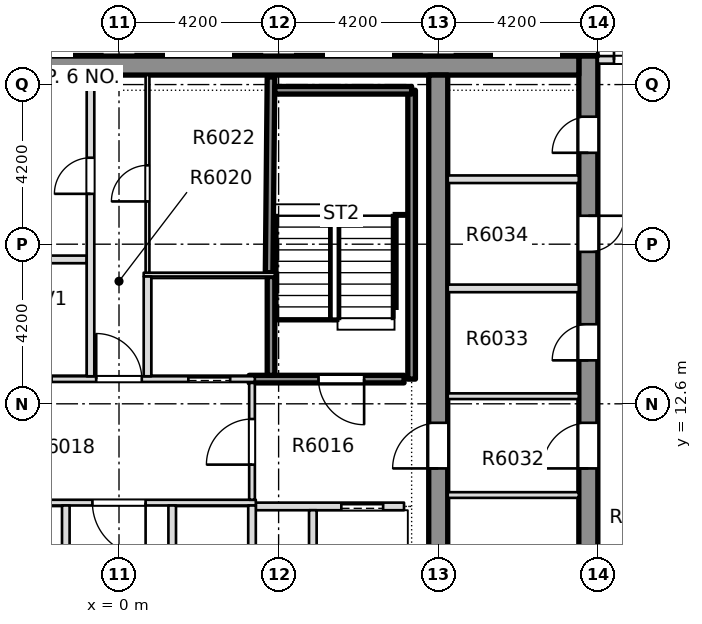
"""IFC4 building model, lengths in metres.
Left out: names, types, materials, properties, quantities, classifications, styles, units other than length and angle.
Written with IfcOpenShell. Run it as: python <this file> out.ifc"""

import sys

from ifc_helpers import new_model, si_unit, direction, frame, frame_2d, origin, place, context, subcontext, project, spatial, rectangle, extrude, element, fill, save


model = new_model("IFC4")
c1 = context("Model", 3, precision=1e-05, world=origin(), true_north=direction((0.0, 1.0)))
c2 = subcontext(c1, "Body", "Model", "MODEL_VIEW")
j1 = project(units=[si_unit("LENGTHUNIT", "METRE"), si_unit("PLANEANGLEUNIT", "RADIAN")], contexts=[c1])
p1 = place(None, origin())
s1 = spatial("IfcSite", under=j1, at=p1, CompositionType="ELEMENT")
p2 = place(p1, origin())
s2 = spatial("IfcBuilding", under=s1, at=p2, CompositionType="ELEMENT")
p3 = place(p2, frame((0.0, 0.0, 230.35)))
s3 = spatial("IfcBuildingStorey", under=s2, at=p3, CompositionType="ELEMENT", Elevation=230.35)
p4 = place(p3, frame((12.35, -8.4, -0.4), z_axis=(0.0, 0.0, 1.0), x_axis=(0.0, 1.0, 0.0)))
e1 = element("IfcWall", 1, at=p4, inside=s3, PredefinedType="SHEAR", context=c2, shape_type="SweptSolid", body=[
    extrude(rectangle(XDim=30.15, YDim=0.5, at=frame_2d((15.075, 0.0))), origin(), (0.0, 0.0, 1.0), 3.45),
])
p5 = place(p4, frame((4.113, 0.0, 0.4)))
e2 = element("IfcOpeningElement", 2, at=p5, cuts=e1, PredefinedType="OPENING", context=c2, shape_type="SweptSolid", body=[
    extrude(rectangle(XDim=0.95, YDim=2.1, at=frame_2d((0.475, 1.05))), frame((0.0, 0.26, 0.0), z_axis=(0.0, -1.0, 0.0), x_axis=(1.0, 0.0, 0.0)), (0.0, 0.0, 1.0), 0.52),
])
p6 = place(p4, frame((9.89, 0.0, 0.4)))
e3 = element("IfcOpeningElement", 3, at=p6, cuts=e1, PredefinedType="OPENING", context=c2, shape_type="SweptSolid", body=[
    extrude(rectangle(XDim=0.95, YDim=2.1, at=frame_2d((0.475, 1.05))), frame((0.0, 0.26, 0.0), z_axis=(0.0, -1.0, 0.0), x_axis=(1.0, 0.0, 0.0)), (0.0, 0.0, 1.0), 0.52),
])
p7 = place(p4, frame((15.052, 0.0, 0.4)))
e4 = element("IfcOpeningElement", 4, at=p7, cuts=e1, PredefinedType="OPENING", context=c2, shape_type="SweptSolid", body=[
    extrude(rectangle(XDim=0.95, YDim=2.1, at=frame_2d((0.475, 1.05))), frame((0.0, 0.26, 0.0), z_axis=(0.0, -1.0, 0.0), x_axis=(1.0, 0.0, 0.0)), (0.0, 0.0, 1.0), 0.52),
])
p8 = place(p4, frame((22.144, 0.0, 0.4)))
e5 = element("IfcOpeningElement", 5, at=p8, cuts=e1, PredefinedType="OPENING", context=c2, shape_type="SweptSolid", body=[
    extrude(rectangle(XDim=0.95, YDim=2.1, at=frame_2d((0.475, 1.05))), frame((0.0, 0.26, 0.0), z_axis=(0.0, -1.0, 0.0), x_axis=(1.0, 0.0, 0.0)), (0.0, 0.0, 1.0), 0.52),
])
p9 = place(p4, frame((24.998, 0.0, 0.4)))
e6 = element("IfcOpeningElement", 6, at=p9, cuts=e1, PredefinedType="OPENING", context=c2, shape_type="SweptSolid", body=[
    extrude(rectangle(XDim=0.95, YDim=2.1, at=frame_2d((0.475, 1.05))), frame((0.0, 0.26, 0.0), z_axis=(0.0, -1.0, 0.0), x_axis=(1.0, 0.0, 0.0)), (0.0, 0.0, 1.0), 0.52),
])
p10 = place(p4, frame((27.605, 0.0, 0.4)))
e7 = element("IfcOpeningElement", 7, at=p10, cuts=e1, PredefinedType="OPENING", context=c2, shape_type="SweptSolid", body=[
    extrude(rectangle(XDim=0.95, YDim=2.1, at=frame_2d((0.475, 1.05))), frame((0.0, 0.26, 0.0), z_axis=(0.0, -1.0, 0.0), x_axis=(1.0, 0.0, 0.0)), (0.0, 0.0, 1.0), 0.52),
])
p11 = place(p4, frame((19.3, 0.0, 0.4)))
e8 = element("IfcOpeningElement", 8, at=p11, cuts=e1, PredefinedType="OPENING", context=c2, shape_type="SweptSolid", body=[
    extrude(rectangle(XDim=1.2, YDim=2.1, at=frame_2d((0.6, 1.05))), frame((0.0, 0.26, 0.0), z_axis=(0.0, -1.0, 0.0), x_axis=(1.0, 0.0, 0.0)), (0.0, 0.0, 1.0), 0.52),
])
p12 = place(p3, frame((-12.1, 21.5, -0.4), z_axis=(0.0, 0.0, 1.0), x_axis=(1.0, 0.0, 0.0)))
e9 = element("IfcWall", 9, at=p12, inside=s3, PredefinedType="SHEAR", context=c2, shape_type="SweptSolid", body=[
    extrude(rectangle(XDim=24.2, YDim=0.5, at=frame_2d((12.1, 0.0))), origin(), (0.0, 0.0, 1.0), 3.45),
])
p13 = place(p3, frame((8.4, -7.9, -0.4), z_axis=(0.0, 0.0, 1.0), x_axis=(0.0, 1.0, 0.0)))
e10 = element("IfcWall", 10, at=p13, inside=s3, PredefinedType="SHEAR", context=c2, shape_type="SweptSolid", body=[
    extrude(rectangle(XDim=29.15, YDim=0.5, at=frame_2d((14.575, 0.0))), origin(), (0.0, 0.0, 1.0), 3.45),
])
p14 = place(p13, frame((18.8, 0.0, 0.4)))
e11 = element("IfcOpeningElement", 11, at=p14, cuts=e10, PredefinedType="OPENING", context=c2, shape_type="SweptSolid", body=[
    extrude(rectangle(XDim=1.2, YDim=2.1, at=frame_2d((0.6, 1.05))), frame((0.0, 0.26, 0.0), z_axis=(0.0, -1.0, 0.0), x_axis=(1.0, 0.0, 0.0)), (0.0, 0.0, 1.0), 0.52),
])
p15 = place(p3, frame((16.35, 21.65, 0.0), z_axis=(0.0, 0.0, 1.0), x_axis=(-1.0, 0.0, 0.0)))
e12 = element("IfcWall", 12, at=p15, inside=s3, PredefinedType="STANDARD", context=c2, shape_type="SweptSolid", body=[
    extrude(rectangle(XDim=3.75, YDim=0.2, at=frame_2d((1.875, 0.0))), origin(), (0.0, 0.0, 1.0), 3.05),
])
p16 = place(p15, frame((2.325, 0.0, 0.0)))
e13 = element("IfcOpeningElement", 13, at=p16, cuts=e12, PredefinedType="OPENING", context=c2, shape_type="SweptSolid", body=[
    extrude(rectangle(XDim=1.0, YDim=2.4, at=frame_2d((0.5, 1.2))), frame((0.0, 0.11, 0.0), z_axis=(0.0, -1.0, 0.0), x_axis=(1.0, 0.0, 0.0)), (0.0, 0.0, 1.0), 0.22),
])
p17 = place(p3, frame((3.6, 9.9, 0.0), z_axis=(0.0, 0.0, 1.0), x_axis=(1.0, 0.0, 0.0)))
e14 = element("IfcWall", 14, at=p17, inside=s3, PredefinedType="PARTITIONING", context=c2, shape_type="SweptSolid", body=[
    extrude(rectangle(XDim=3.9, YDim=0.2, at=frame_2d((1.95, 0.0))), origin(), (0.0, 0.0, 1.0), 3.05),
])
p18 = place(p17, frame((2.25, 0.0, 0.0)))
e15 = element("IfcOpeningElement", 15, at=p18, cuts=e14, PredefinedType="OPENING", context=c2, shape_type="SweptSolid", body=[
    extrude(rectangle(XDim=1.1, YDim=2.1, at=frame_2d((0.55, 1.05))), frame((0.0, 0.11, 0.0), z_axis=(0.0, -1.0, 0.0), x_axis=(1.0, 0.0, 0.0)), (0.0, 0.0, 1.0), 0.22),
])
p19 = place(p3, frame((-3.6, 10.0, 0.0), z_axis=(0.0, 0.0, 1.0), x_axis=(1.0, 0.0, 0.0)))
e16 = element("IfcWall", 16, at=p19, inside=s3, PredefinedType="PARTITIONING", context=c2, shape_type="SweptSolid", body=[
    extrude(rectangle(XDim=7.2, YDim=0.15, at=frame_2d((3.6, 0.0))), origin(), (0.0, 0.0, 1.0), 3.05),
])
p20 = place(p19, frame((2.9, 0.0, 0.0)))
e17 = element("IfcOpeningElement", 17, at=p20, cuts=e16, PredefinedType="OPENING", context=c2, shape_type="SweptSolid", body=[
    extrude(rectangle(XDim=1.4, YDim=2.1, at=frame_2d((0.7, 1.05))), frame((0.0, 0.085, 0.0), z_axis=(0.0, -1.0, 0.0), x_axis=(1.0, 0.0, 0.0)), (0.0, 0.0, 1.0), 0.17),
])
p21 = place(p3, frame((-3.575, 13.25, 0.0), z_axis=(0.0, 0.0, 1.0), x_axis=(1.0, 0.0, 0.0)))
e18 = element("IfcWall", 18, at=p21, inside=s3, PredefinedType="PARTITIONING", context=c2, shape_type="SweptSolid", body=[
    extrude(rectangle(XDim=7.15, YDim=0.15, at=frame_2d((3.575, 0.0))), origin(), (0.0, 0.0, 1.0), 3.05),
])
p22 = place(p21, frame((0.6, 0.0, 0.0)))
e19 = element("IfcOpeningElement", 19, at=p22, cuts=e18, PredefinedType="OPENING", context=c2, shape_type="SweptSolid", body=[
    extrude(rectangle(XDim=1.2, YDim=2.1, at=frame_2d((0.6, 1.05))), frame((0.0, 0.085, 0.0), z_axis=(0.0, -1.0, 0.0), x_axis=(1.0, 0.0, 0.0)), (0.0, 0.0, 1.0), 0.17),
])
p23 = place(p21, frame((5.4, 0.0, 0.0)))
e20 = element("IfcOpeningElement", 20, at=p23, cuts=e18, PredefinedType="OPENING", context=c2, shape_type="SweptSolid", body=[
    extrude(rectangle(XDim=1.1, YDim=2.1, at=frame_2d((0.55, 1.05))), frame((0.0, 0.085, 0.0), z_axis=(0.0, -1.0, 0.0), x_axis=(1.0, 0.0, 0.0)), (0.0, 0.0, 1.0), 0.17),
])
p24 = place(p21, frame((2.975, 0.0, 0.0)))
e21 = element("IfcOpeningElement", 21, at=p24, cuts=e18, PredefinedType="OPENING", context=c2, shape_type="SweptSolid", body=[
    extrude(rectangle(XDim=1.2, YDim=2.1, at=frame_2d((0.6, 1.05))), frame((0.0, 0.085, 0.0), z_axis=(0.0, -1.0, 0.0), x_axis=(1.0, 0.0, 0.0)), (0.0, 0.0, 1.0), 0.17),
])
p25 = place(p3, frame((3.425, 13.25, 0.0), z_axis=(0.0, 0.0, 1.0), x_axis=(1.0, 0.0, 0.0)))
e22 = element("IfcWall", 22, at=p25, inside=s3, PredefinedType="SOLIDWALL", context=c2, shape_type="SweptSolid", body=[
    extrude(rectangle(XDim=4.075, YDim=0.2, at=frame_2d((2.038, 0.0))), origin(), (0.0, 0.0, 1.0), 3.05),
])
p26 = place(p25, frame((1.825, 0.0, 0.0)))
e23 = element("IfcOpeningElement", 23, at=p26, cuts=e22, PredefinedType="OPENING", context=c2, shape_type="SweptSolid", body=[
    extrude(rectangle(XDim=1.2, YDim=2.1, at=frame_2d((0.6, 1.05))), frame((0.0, 0.11, 0.0), z_axis=(0.0, -1.0, 0.0), x_axis=(1.0, 0.0, 0.0)), (0.0, 0.0, 1.0), 0.22),
])
p27 = place(p3, frame((0.65, 16.0, 0.0), z_axis=(0.0, 0.0, 1.0), x_axis=(1.0, 0.0, 0.0)))
e24 = element("IfcWall", 24, at=p27, inside=s3, PredefinedType="PARTITIONING", context=c2, shape_type="SweptSolid", body=[
    extrude(rectangle(XDim=3.45, YDim=0.1, at=frame_2d((1.725, 0.0))), origin(), (0.0, 0.0, 1.0), 3.05),
])
p28 = place(p3, frame((-3.9, 16.4, 0.0), z_axis=(0.0, 0.0, 1.0), x_axis=(1.0, 0.0, 0.0)))
e25 = element("IfcWall", 25, at=p28, inside=s3, PredefinedType="PARTITIONING", context=c2, shape_type="SweptSolid", body=[
    extrude(rectangle(XDim=3.05, YDim=0.2, at=frame_2d((1.525, 0.0))), origin(), (0.0, 0.0, 1.0), 3.05),
])
p29 = place(p3, frame((-1.4, 7.075, 0.0), z_axis=(0.0, 0.0, 1.0), x_axis=(0.0, 1.0, 0.0)))
e26 = element("IfcWall", 26, at=p29, inside=s3, PredefinedType="PARTITIONING", context=c2, shape_type="SweptSolid", body=[
    extrude(rectangle(XDim=2.85, YDim=0.2, at=frame_2d((1.425, 0.0))), origin(), (0.0, 0.0, 1.0), 3.05),
])
p30 = place(p3, frame((-0.75, 13.325, 0.0), z_axis=(0.0, 0.0, 1.0), x_axis=(0.0, 1.0, 0.0)))
e27 = element("IfcWall", 27, at=p30, inside=s3, PredefinedType="PARTITIONING", context=c2, shape_type="SweptSolid", body=[
    extrude(rectangle(XDim=7.924, YDim=0.2, at=frame_2d((3.962, 0.0))), origin(), (0.0, 0.0, 1.0), 3.05),
])
p31 = place(p30, frame((4.8, 0.0, 0.0)))
e28 = element("IfcOpeningElement", 28, at=p31, cuts=e27, PredefinedType="OPENING", context=c2, shape_type="SweptSolid", body=[
    extrude(rectangle(XDim=0.95, YDim=2.1, at=frame_2d((0.475, 1.05))), frame((0.0, 0.11, 0.0), z_axis=(0.0, -1.0, 0.0), x_axis=(1.0, 0.0, 0.0)), (0.0, 0.0, 1.0), 0.22),
])
p32 = place(p3, frame((0.75, 13.325, 0.0), z_axis=(0.0, 0.0, 1.0), x_axis=(0.0, 1.0, 0.0)))
e29 = element("IfcWall", 29, at=p32, inside=s3, PredefinedType="PARTITIONING", context=c2, shape_type="SweptSolid", body=[
    extrude(rectangle(XDim=2.625, YDim=0.2, at=frame_2d((1.312, 0.0))), origin(), (0.0, 0.0, 1.0), 3.05),
])
p33 = place(p3, frame((0.75, 16.05, 0.0), z_axis=(0.0, 0.0, 1.0), x_axis=(0.0, 1.0, 0.0)))
e30 = element("IfcWall", 30, at=p33, inside=s3, PredefinedType="PARTITIONING", context=c2, shape_type="SweptSolid", body=[
    extrude(rectangle(XDim=5.199, YDim=0.1, at=frame_2d((2.6, 0.0))), origin(), (0.0, 0.0, 1.0), 3.05),
])
p34 = place(p33, frame((1.875, 0.0, 0.0)))
e31 = element("IfcOpeningElement", 31, at=p34, cuts=e30, PredefinedType="OPENING", context=c2, shape_type="SweptSolid", body=[
    extrude(rectangle(XDim=0.95, YDim=2.1, at=frame_2d((0.475, 1.05))), frame((0.0, 0.06, 0.0), z_axis=(0.0, -1.0, 0.0), x_axis=(1.0, 0.0, 0.0)), (0.0, 0.0, 1.0), 0.12),
])
for number, where, z_axis, x_axis in (
    (32, (1.4, 7.075, 0.0), (0.0, 0.0, 1.0), (0.0, 1.0, 0.0)),
    (33, (3.5, 7.075, 0.0), (0.0, 0.0, 1.0), (0.0, 1.0, 0.0)),
):
    element("IfcWall", number, at=place(p3, frame(where, z_axis=z_axis, x_axis=x_axis)), inside=s3, PredefinedType="PARTITIONING", context=c2, shape_type="SweptSolid", body=[
        extrude(rectangle(XDim=2.85, YDim=0.2, at=frame_2d((1.425, 0.0))), origin(), (0.0, 0.0, 1.0), 3.05),
    ])
p35 = place(p3, frame((3.5, 10.075, 0.0), z_axis=(0.0, 0.0, 1.0), x_axis=(0.0, 1.0, 0.0)))
e34 = element("IfcWall", 34, at=p35, inside=s3, PredefinedType="PARTITIONING", context=c2, shape_type="SweptSolid", body=[
    extrude(rectangle(XDim=3.075, YDim=0.15, at=frame_2d((1.538, 0.0))), origin(), (0.0, 0.0, 1.0), 3.05),
])
p36 = place(p35, frame((0.925, 0.0, 0.0)))
e35 = element("IfcOpeningElement", 35, at=p36, cuts=e34, PredefinedType="OPENING", context=c2, shape_type="SweptSolid", body=[
    extrude(rectangle(XDim=1.2, YDim=2.1, at=frame_2d((0.6, 1.05))), frame((0.0, 0.085, 0.0), z_axis=(0.0, -1.0, 0.0), x_axis=(1.0, 0.0, 0.0)), (0.0, 0.0, 1.0), 0.17),
])
p37 = place(p3, frame((4.0, 13.35, 0.0), z_axis=(0.0, 0.0, 1.0), x_axis=(0.0, 1.0, 0.0)))
e36 = element("IfcWall", 36, at=p37, inside=s3, PredefinedType="SOLIDWALL", context=c2, shape_type="SweptSolid", body=[
    extrude(rectangle(XDim=2.6, YDim=0.2, at=frame_2d((1.3, 0.0))), origin(), (0.0, 0.0, 1.0), 3.05),
])
p38 = place(p3, frame((3.95, 16.05, 0.0), z_axis=(0.0, 0.0, 1.0), x_axis=(0.009719787395, 0.999952761751, 0.0)))
e37 = element("IfcWall", 37, at=p38, inside=s3, PredefinedType="SOLIDWALL", context=c2, shape_type="SweptSolid", body=[
    extrude(rectangle(XDim=5.149, YDim=0.2, at=frame_2d((2.575, 0.0))), origin(), (0.0, 0.0, 1.0), 3.05),
])
p39 = place(p3, frame((5.1, 7.075, 0.0), z_axis=(0.0, 0.0, 1.0), x_axis=(0.0, 1.0, 0.0)))
e38 = element("IfcWall", 38, at=p39, inside=s3, PredefinedType="PARTITIONING", context=c2, shape_type="SweptSolid", body=[
    extrude(rectangle(XDim=2.725, YDim=0.2, at=frame_2d((1.363, 0.0))), origin(), (0.0, 0.0, 1.0), 3.05),
])
for number, where, z_axis, x_axis in (
    (39, (8.651, 10.2, 0.0), (0.0, 0.0, 1.0), (1.0, 0.0, 0.0)),
    (40, (8.651, 12.8, 0.0), (0.0, 0.0, 1.0), (1.0, 0.0, 0.0)),
):
    element("IfcWall", number, at=place(p3, frame(where, z_axis=z_axis, x_axis=x_axis)), inside=s3, PredefinedType="PARTITIONING", context=c2, shape_type="SweptSolid", body=[
        extrude(rectangle(XDim=3.448, YDim=0.15, at=frame_2d((1.724, 0.0))), origin(), (0.0, 0.0, 1.0), 3.05),
    ])
for number, where, z_axis, x_axis in (
    (41, (8.651, 15.637, 0.0), (0.0, 0.0, 1.0), (1.0, 0.0, 0.0)),
    (42, (8.651, 18.509, 0.0), (0.0, 0.0, 1.0), (1.0, 0.0, 0.0)),
):
    element("IfcWall", number, at=place(p3, frame(where, z_axis=z_axis, x_axis=x_axis)), inside=s3, PredefinedType="PARTITIONING", context=c2, shape_type="SweptSolid", body=[
        extrude(rectangle(XDim=3.448, YDim=0.2, at=frame_2d((1.724, 0.0))), origin(), (0.0, 0.0, 1.0), 3.05),
    ])
p40 = place(p3, frame((7.7, 13.25, 0.0), z_axis=(0.0, 0.0, 1.0), x_axis=(0.0, 1.0, 0.0)))
e43 = element("IfcWall", 43, at=p40, inside=s3, PredefinedType="SOLIDWALL", context=c2, shape_type="SweptSolid", body=[
    extrude(rectangle(XDim=7.6, YDim=0.2, at=frame_2d((3.8, 0.0))), origin(), (0.0, 0.0, 1.0), 3.05),
])
p41 = place(p3, frame((4.1, 20.85, 0.0), z_axis=(0.0, 0.0, 1.0), x_axis=(1.0, 0.0, 0.0)))
e44 = element("IfcWall", 44, at=p41, inside=s3, PredefinedType="SOLIDWALL", context=c2, shape_type="SweptSolid", body=[
    extrude(rectangle(XDim=3.6, YDim=0.2, at=frame_2d((1.8, 0.0))), origin(), (0.0, 0.0, 1.0), 3.05),
])
p42 = place(p16, origin())
e45 = element("IfcDoor", 45, at=p42, inside=s3, OperationType="SINGLE_SWING_LEFT", PredefinedType="DOOR", context=c2, shape_type="SweptSolid", body=[
    extrude(rectangle(XDim=1.0, YDim=2.4, at=frame_2d((0.5, 1.2))), frame((0.0, 0.025, 0.0), z_axis=(0.0, -1.0, 0.0), x_axis=(1.0, 0.0, 0.0)), (0.0, 0.0, 1.0), 0.05),
])
fill(e13, e45)
p43 = place(p26, origin())
e46 = element("IfcDoor", 46, at=p43, inside=s3, OperationType="SINGLE_SWING_RIGHT", PredefinedType="DOOR", context=c2, shape_type="SweptSolid", body=[
    extrude(rectangle(XDim=1.2, YDim=2.1, at=frame_2d((0.6, 1.05))), frame((0.0, 0.025, 0.0), z_axis=(0.0, -1.0, 0.0), x_axis=(1.0, 0.0, 0.0)), (0.0, 0.0, 1.0), 0.05),
])
fill(e23, e46)
p44 = place(p18, origin())
e47 = element("IfcDoor", 47, at=p44, inside=s3, OperationType="SLIDING_TO_LEFT", PredefinedType="DOOR", context=c2, shape_type="SweptSolid", body=[
    extrude(rectangle(XDim=1.1, YDim=2.1, at=frame_2d((0.55, 1.05))), frame((0.0, 0.025, 0.0), z_axis=(0.0, -1.0, 0.0), x_axis=(1.0, 0.0, 0.0)), (0.0, 0.0, 1.0), 0.05),
])
fill(e15, e47)
p45 = place(p20, origin())
e48 = element("IfcDoor", 48, at=p45, inside=s3, OperationType="SINGLE_SWING_RIGHT", PredefinedType="DOOR", context=c2, shape_type="SweptSolid", body=[
    extrude(rectangle(XDim=1.4, YDim=2.1, at=frame_2d((0.7, 1.05))), frame((0.0, 0.025, 0.0), z_axis=(0.0, -1.0, 0.0), x_axis=(1.0, 0.0, 0.0)), (0.0, 0.0, 1.0), 0.05),
])
fill(e17, e48)
p46 = place(p23, origin())
e49 = element("IfcDoor", 49, at=p46, inside=s3, OperationType="SLIDING_TO_LEFT", PredefinedType="DOOR", context=c2, shape_type="SweptSolid", body=[
    extrude(rectangle(XDim=1.1, YDim=2.1, at=frame_2d((0.55, 1.05))), frame((0.0, 0.025, 0.0), z_axis=(0.0, -1.0, 0.0), x_axis=(1.0, 0.0, 0.0)), (0.0, 0.0, 1.0), 0.05),
])
fill(e20, e49)
p47 = place(p24, origin())
e50 = element("IfcDoor", 50, at=p47, inside=s3, OperationType="SINGLE_SWING_RIGHT", PredefinedType="DOOR", context=c2, shape_type="SweptSolid", body=[
    extrude(rectangle(XDim=1.2, YDim=2.1, at=frame_2d((0.6, 1.05))), frame((0.0, 0.025, 0.0), z_axis=(0.0, -1.0, 0.0), x_axis=(1.0, 0.0, 0.0)), (0.0, 0.0, 1.0), 0.05),
])
fill(e21, e50)
p48 = place(p31, origin())
e51 = element("IfcDoor", 51, at=p48, inside=s3, OperationType="SINGLE_SWING_RIGHT", PredefinedType="DOOR", context=c2, shape_type="SweptSolid", body=[
    extrude(rectangle(XDim=0.95, YDim=2.1, at=frame_2d((0.475, 1.05))), frame((0.0, 0.025, 0.0), z_axis=(0.0, -1.0, 0.0), x_axis=(1.0, 0.0, 0.0)), (0.0, 0.0, 1.0), 0.05),
])
fill(e28, e51)
p49 = place(p34, origin())
e52 = element("IfcDoor", 52, at=p49, inside=s3, OperationType="SINGLE_SWING_LEFT", PredefinedType="DOOR", context=c2, shape_type="SweptSolid", body=[
    extrude(rectangle(XDim=0.95, YDim=2.1, at=frame_2d((0.475, 1.05))), frame((0.0, 0.025, 0.0), z_axis=(0.0, -1.0, 0.0), x_axis=(1.0, 0.0, 0.0)), (0.0, 0.0, 1.0), 0.05),
])
fill(e31, e52)
p50 = place(p36, origin())
e53 = element("IfcDoor", 53, at=p50, inside=s3, OperationType="SINGLE_SWING_LEFT", PredefinedType="DOOR", context=c2, shape_type="SweptSolid", body=[
    extrude(rectangle(XDim=1.2, YDim=2.1, at=frame_2d((0.6, 1.05))), frame((0.0, 0.025, 0.0), z_axis=(0.0, -1.0, 0.0), x_axis=(1.0, 0.0, 0.0)), (0.0, 0.0, 1.0), 0.05),
])
fill(e35, e53)
p51 = place(p8, origin())
e54 = element("IfcDoor", 54, at=p51, inside=s3, OperationType="SINGLE_SWING_LEFT", PredefinedType="DOOR", context=c2, shape_type="SweptSolid", body=[
    extrude(rectangle(XDim=0.95, YDim=2.1, at=frame_2d((0.475, 1.05))), frame((0.0, 0.025, 0.0), z_axis=(0.0, -1.0, 0.0), x_axis=(1.0, 0.0, 0.0)), (0.0, 0.0, 1.0), 0.05),
])
fill(e5, e54)
p52 = place(p9, origin())
e55 = element("IfcDoor", 55, at=p52, inside=s3, OperationType="SINGLE_SWING_LEFT", PredefinedType="DOOR", context=c2, shape_type="SweptSolid", body=[
    extrude(rectangle(XDim=0.95, YDim=2.1, at=frame_2d((0.475, 1.05))), frame((0.0, 0.025, 0.0), z_axis=(0.0, -1.0, 0.0), x_axis=(1.0, 0.0, 0.0)), (0.0, 0.0, 1.0), 0.05),
])
fill(e6, e55)
p53 = place(p10, origin())
e56 = element("IfcDoor", 56, at=p53, inside=s3, OperationType="SINGLE_SWING_LEFT", PredefinedType="DOOR", context=c2, shape_type="SweptSolid", body=[
    extrude(rectangle(XDim=0.95, YDim=2.1, at=frame_2d((0.475, 1.05))), frame((0.0, 0.025, 0.0), z_axis=(0.0, -1.0, 0.0), x_axis=(1.0, 0.0, 0.0)), (0.0, 0.0, 1.0), 0.05),
])
fill(e7, e56)
p54 = place(p11, origin())
e57 = element("IfcDoor", 57, at=p54, inside=s3, OperationType="SINGLE_SWING_LEFT", PredefinedType="DOOR", context=c2, shape_type="SweptSolid", body=[
    extrude(rectangle(XDim=1.2, YDim=2.1, at=frame_2d((0.6, 1.05))), frame((0.0, 0.025, 0.0), z_axis=(0.0, -1.0, 0.0), x_axis=(1.0, 0.0, 0.0)), (0.0, 0.0, 1.0), 0.05),
])
fill(e8, e57)
p55 = place(p14, origin())
e58 = element("IfcDoor", 58, at=p55, inside=s3, OperationType="SINGLE_SWING_LEFT", PredefinedType="DOOR", context=c2, shape_type="SweptSolid", body=[
    extrude(rectangle(XDim=1.2, YDim=2.1, at=frame_2d((0.6, 1.05))), frame((0.0, 0.025, 0.0), z_axis=(0.0, -1.0, 0.0), x_axis=(1.0, 0.0, 0.0)), (0.0, 0.0, 1.0), 0.05),
])
fill(e11, e58)
save(model, sys.argv[1])
